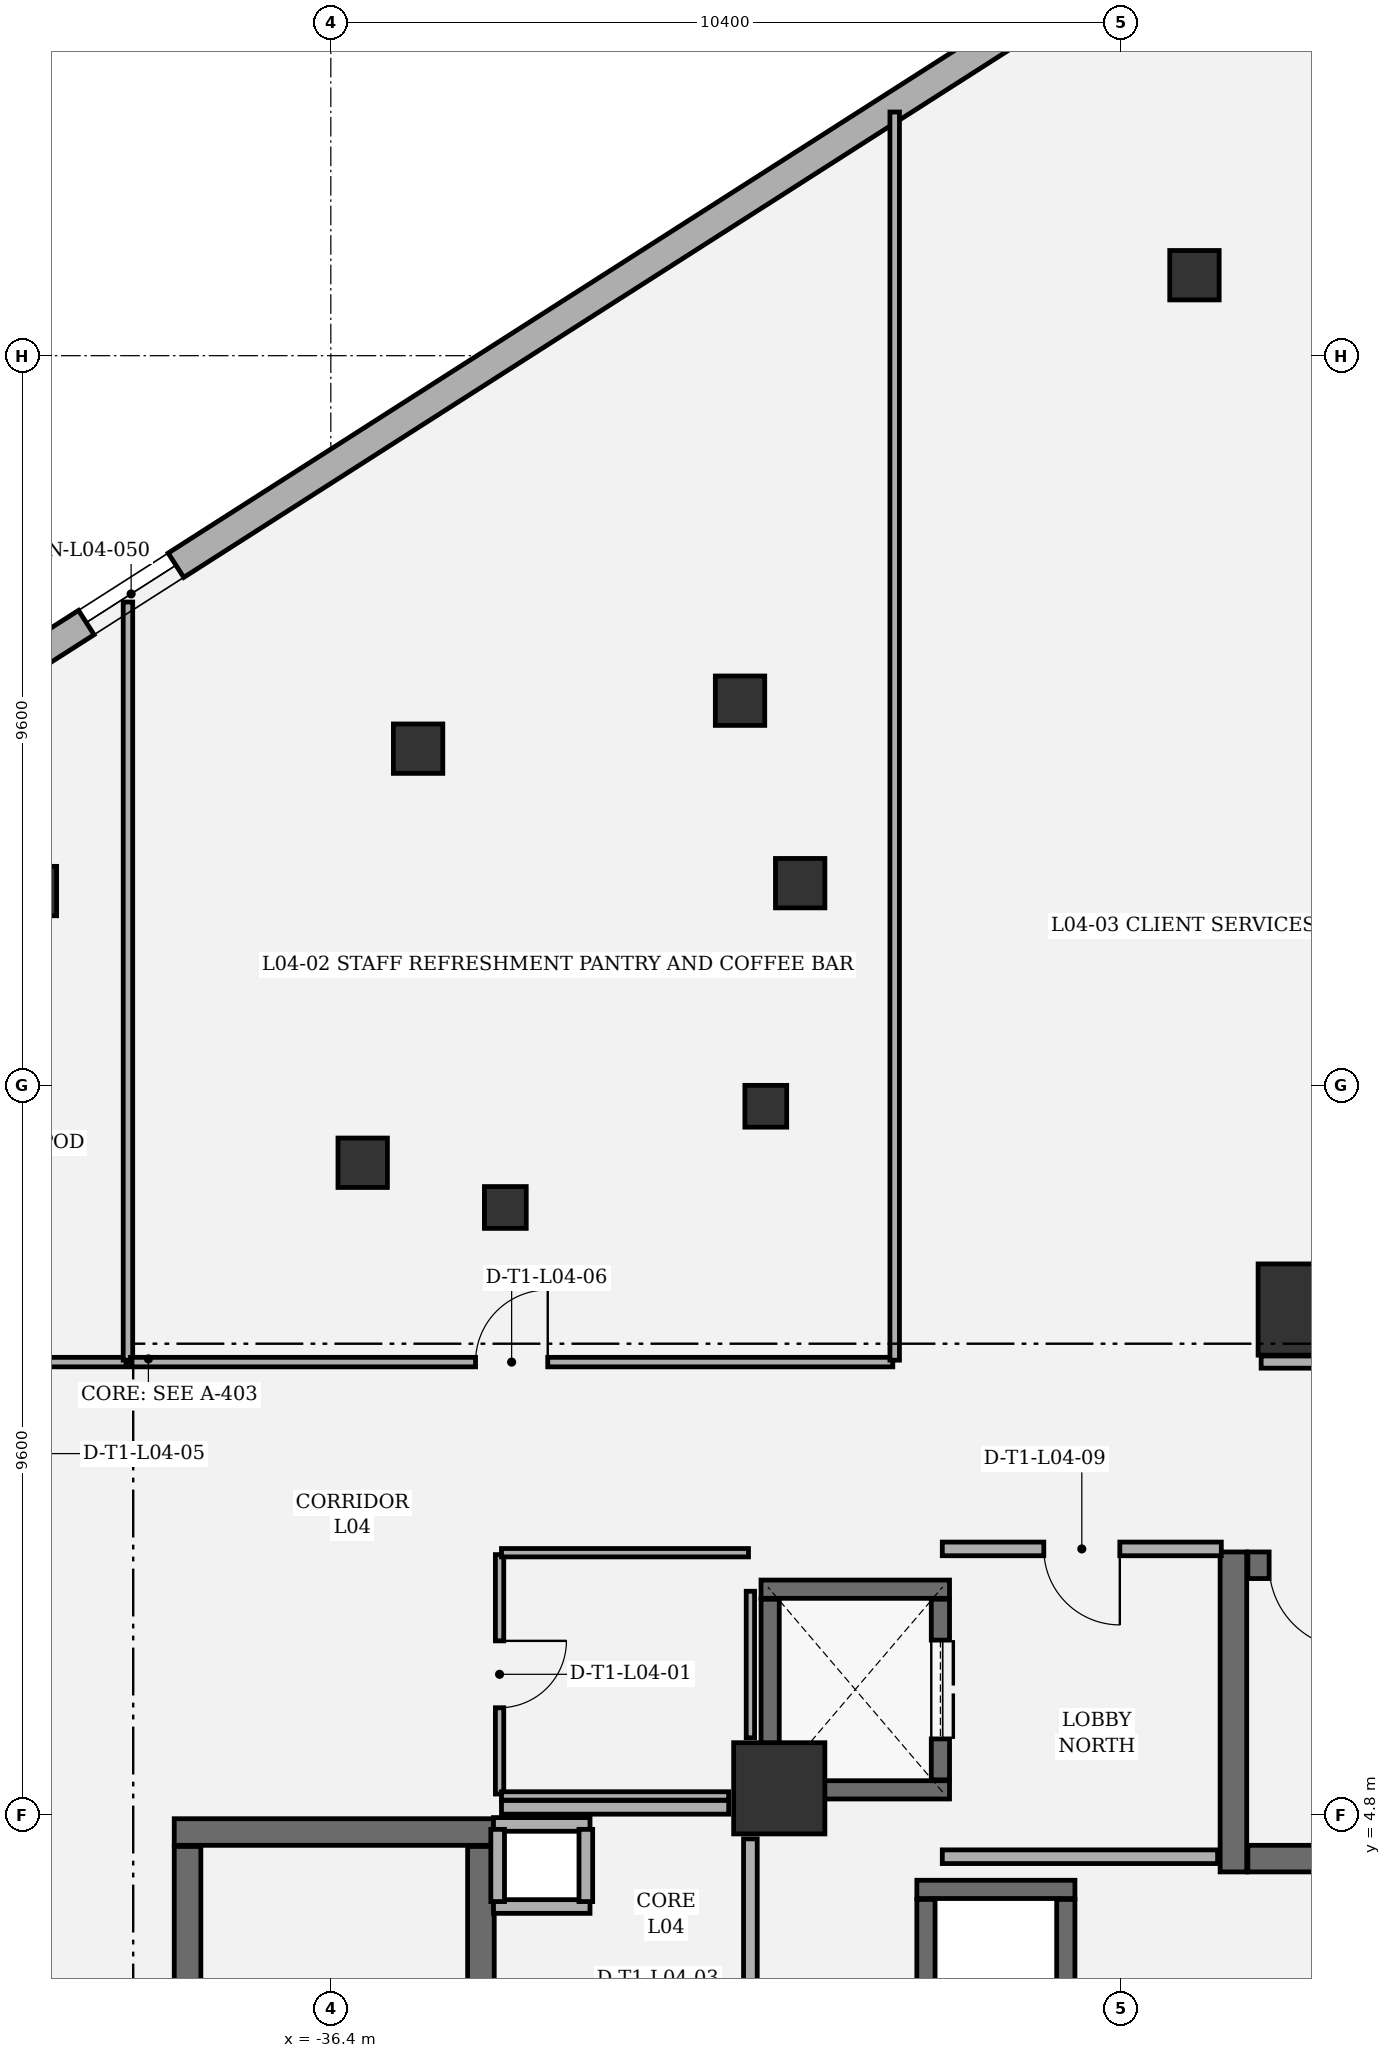
"""IFC4 building model, lengths in metres.
Left out: names, types, materials, properties, quantities, classifications, styles, units other than length and angle.
Written with IfcOpenShell. Run it as: python <this file> out.ifc"""

import sys

from ifc_helpers import new_model, si_unit, direction, frame, frame_2d, origin, origin_2d, place, context, subcontext, project, spatial, rectangle, extrude, element, fill, save


model = new_model("IFC4")
c1 = context("Model", 3, precision=1e-05, world=origin(), true_north=direction((0.0, 1.0)))
c2 = subcontext(c1, "Body", "Model", "MODEL_VIEW")
j1 = project(units=[si_unit("LENGTHUNIT", "METRE"), si_unit("PLANEANGLEUNIT", "RADIAN")], contexts=[c1])
p1 = place(None, origin())
s1 = spatial("IfcSite", under=j1, at=p1, CompositionType="ELEMENT")
p2 = place(p1, origin())
s2 = spatial("IfcBuilding", under=s1, at=p2, CompositionType="ELEMENT")
p3 = place(p2, frame((0.0, 0.0, 22.0)))
s3 = spatial("IfcBuildingStorey", under=s2, at=p3, CompositionType="ELEMENT", Elevation=22.0)
for number, where, z_axis, x_axis in (
    (1, (-23.6, 11.45, 0.0), (0.0, 0.0, 1.0), (1.0, 0.0, 0.0)),
    (2, (-30.5, 5.15, 0.0), (0.0, 0.0, 1.0), (1.0, 0.0, 0.0)),
):
    element("IfcColumn", number, at=place(p3, frame(where, z_axis=z_axis, x_axis=x_axis)), inside=s3, PredefinedType="COLUMN", context=c2, shape_type="SweptSolid", body=[
        extrude(rectangle(XDim=1.2, YDim=1.2, at=origin_2d()), origin(), (0.0, 0.0, 1.0), 5.0),
    ])
for number, where, z_axis, x_axis in (
    (3, (-40.333, 16.956, 0.0), (0.0, 0.0, 1.0), (1.0, 0.0, 0.0)),
    (4, (-35.252, 18.829, 0.0), (0.0, 0.0, 1.0), (1.0, 0.0, 0.0)),
    (5, (-25.038, 25.059, 0.0), (0.0, 0.0, 1.0), (1.0, 0.0, 0.0)),
    (6, (-31.016, 19.46, 0.0), (0.0, 0.0, 1.0), (1.0, 0.0, 0.0)),
    (7, (-35.981, 13.381, 0.0), (0.0, 0.0, 1.0), (1.0, 0.0, 0.0)),
    (8, (-30.225, 17.06, 0.0), (0.0, 0.0, 1.0), (1.0, 0.0, 0.0)),
):
    element("IfcColumn", number, at=place(p3, frame(where, z_axis=z_axis, x_axis=x_axis)), inside=s3, PredefinedType="COLUMN", context=c2, shape_type="SweptSolid", body=[
        extrude(rectangle(XDim=0.65, YDim=0.65, at=origin_2d()), origin(), (0.0, 0.0, 1.0), 5.0),
    ])
for number, where, z_axis, x_axis in (
    (9, (-34.104, 12.792, 0.0), (0.0, 0.0, 1.0), (1.0, 0.0, 0.0)),
    (10, (-30.677, 14.124, 0.0), (0.0, 0.0, 1.0), (1.0, 0.0, 0.0)),
):
    element("IfcColumn", number, at=place(p3, frame(where, z_axis=z_axis, x_axis=x_axis)), inside=s3, PredefinedType="COLUMN", context=c2, shape_type="SweptSolid", body=[
        extrude(rectangle(XDim=0.55, YDim=0.55, at=origin_2d()), origin(), (0.0, 0.0, 1.0), 5.0),
    ])
p4 = place(p3, frame((-64.419, 4.637, 0.0), z_axis=(0.0, 0.0, 1.0), x_axis=(0.842602364841, 0.538536214905, 0.0)))
e11 = element("IfcWall", 11, at=p4, inside=s3, PredefinedType="SOLIDWALL", context=c2, shape_type="SweptSolid", body=[
    extrude(rectangle(XDim=60.27, YDim=0.38, at=frame_2d((30.135, 0.0))), origin(), (0.0, 0.0, 1.0), 4.58),
])
p5 = place(p4, frame((29.435, 0.0, 0.8)))
e12 = element("IfcOpeningElement", 12, at=p5, cuts=e11, PredefinedType="OPENING", context=c2, shape_type="SweptSolid", body=[
    extrude(rectangle(XDim=1.4, YDim=1.5, at=frame_2d((0.7, 0.75))), frame((0.0, 0.2, 0.0), z_axis=(0.0, -1.0, 0.0), x_axis=(1.0, 0.0, 0.0)), (0.0, 0.0, 1.0), 0.4),
])
p6 = place(p3, frame((-24.525, 8.26, 0.0), z_axis=(0.0, 0.0, 1.0), x_axis=(0.0, -1.0, 0.0)))
e13 = element("IfcWall", 13, at=p6, inside=s3, PredefinedType="SHEAR", context=c2, shape_type="SweptSolid", body=[
    extrude(rectangle(XDim=4.21, YDim=0.35, at=frame_2d((2.105, 0.0))), origin(), (0.0, 0.0, 1.0), 4.58),
])
p7 = place(p3, frame((-24.335, 4.225, 0.0), z_axis=(0.0, 0.0, 1.0), x_axis=(1.0, 0.0, 0.0)))
e14 = element("IfcWall", 14, at=p7, inside=s3, PredefinedType="SHEAR", context=c2, shape_type="SweptSolid", body=[
    extrude(rectangle(XDim=8.12, YDim=0.35, at=frame_2d((4.06, 0.0))), origin(), (0.0, 0.0, 1.0), 4.58),
])
p8 = place(p3, frame((-16.215, 8.085, 0.0), z_axis=(0.0, 0.0, 1.0), x_axis=(-1.0, 0.0, 0.0)))
e15 = element("IfcWall", 15, at=p8, inside=s3, PredefinedType="SHEAR", context=c2, shape_type="SweptSolid", body=[
    extrude(rectangle(XDim=8.12, YDim=0.35, at=frame_2d((4.06, 0.0))), origin(), (0.0, 0.0, 1.0), 4.58),
])
p9 = place(p8, frame((6.74, 0.0, 0.0)))
e16 = element("IfcOpeningElement", 16, at=p9, cuts=e15, PredefinedType="OPENING", context=c2, shape_type="SweptSolid", body=[
    extrude(rectangle(XDim=1.1, YDim=2.2, at=frame_2d((0.55, 1.1))), frame((0.0, 0.185, 0.0), z_axis=(0.0, -1.0, 0.0), x_axis=(1.0, 0.0, 0.0)), (0.0, 0.0, 1.0), 0.37),
])
p10 = place(p3, frame((-34.25, 4.575, 0.0), z_axis=(0.0, 0.0, 1.0), x_axis=(-1.0, 0.0, 0.0)))
e17 = element("IfcWall", 17, at=p10, inside=s3, PredefinedType="SHEAR", context=c2, shape_type="SweptSolid", body=[
    extrude(rectangle(XDim=4.21, YDim=0.35, at=frame_2d((2.105, 0.0))), origin(), (0.0, 0.0, 1.0), 4.58),
])
for number, where, z_axis, x_axis in (
    (18, (-34.425, -4.385, 0.0), (0.0, 0.0, 1.0), (0.0, 1.0, 0.0)),
    (19, (-38.285, 4.385, 0.0), (0.0, 0.0, 1.0), (0.0, -1.0, 0.0)),
):
    element("IfcWall", number, at=place(p3, frame(where, z_axis=z_axis, x_axis=x_axis)), inside=s3, PredefinedType="SHEAR", context=c2, shape_type="SweptSolid", body=[
        extrude(rectangle(XDim=8.77, YDim=0.35, at=frame_2d((4.385, 0.0))), origin(), (0.0, 0.0, 1.0), 4.58),
    ])
for number, where, z_axis, x_axis in (
    (20, (-28.26, 5.13, 0.0), (0.0, 0.0, 1.0), (-1.0, 0.0, 0.0)),
    (21, (-30.74, 7.77, 0.0), (0.0, 0.0, 1.0), (1.0, 0.0, 0.0)),
):
    element("IfcWall", number, at=place(p3, frame(where, z_axis=z_axis, x_axis=x_axis)), inside=s3, PredefinedType="SHEAR", context=c2, shape_type="SweptSolid", body=[
        extrude(rectangle(XDim=2.48, YDim=0.24, at=frame_2d((1.24, 0.0))), origin(), (0.0, 0.0, 1.0), 4.58),
    ])
p11 = place(p3, frame((-30.62, 5.262, 0.0), z_axis=(0.0, 0.0, 1.0), x_axis=(0.0, 1.0, 0.0)))
e22 = element("IfcWall", 22, at=p11, inside=s3, PredefinedType="SHEAR", context=c2, shape_type="SweptSolid", body=[
    extrude(rectangle(XDim=2.376, YDim=0.24, at=frame_2d((1.188, 0.0))), origin(), (0.0, 0.0, 1.0), 4.58),
])
p12 = place(p3, frame((-28.38, 7.638, 0.0), z_axis=(0.0, 0.0, 1.0), x_axis=(0.0, -1.0, 0.0)))
e23 = element("IfcWall", 23, at=p12, inside=s3, PredefinedType="SHEAR", context=c2, shape_type="SweptSolid", body=[
    extrude(rectangle(XDim=2.376, YDim=0.24, at=frame_2d((1.188, 0.0))), origin(), (0.0, 0.0, 1.0), 4.58),
])
p13 = place(p12, frame((0.538, 0.0, 0.0)))
e24 = element("IfcOpeningElement", 24, at=p13, cuts=e23, PredefinedType="OPENING", context=c2, shape_type="SweptSolid", body=[
    extrude(rectangle(XDim=1.3, YDim=2.3, at=frame_2d((0.65, 1.15))), frame((0.0, 0.13, 0.0), z_axis=(0.0, -1.0, 0.0), x_axis=(1.0, 0.0, 0.0)), (0.0, 0.0, 1.0), 0.26),
])
p14 = place(p3, frame((-28.69, 3.82, 0.0), z_axis=(0.0, 0.0, 1.0), x_axis=(1.0, 0.0, 0.0)))
e25 = element("IfcWall", 25, at=p14, inside=s3, PredefinedType="SHEAR", context=c2, shape_type="SweptSolid", body=[
    extrude(rectangle(XDim=2.08, YDim=0.24, at=frame_2d((1.04, 0.0))), origin(), (0.0, 0.0, 1.0), 4.58),
])
for number, where, z_axis, x_axis in (
    (26, (-28.57, 1.562, 0.0), (0.0, 0.0, 1.0), (0.0, 1.0, 0.0)),
    (27, (-26.73, 3.688, 0.0), (0.0, 0.0, 1.0), (0.0, -1.0, 0.0)),
):
    element("IfcWall", number, at=place(p3, frame(where, z_axis=z_axis, x_axis=x_axis)), inside=s3, PredefinedType="SHEAR", context=c2, shape_type="SweptSolid", body=[
        extrude(rectangle(XDim=2.126, YDim=0.24, at=frame_2d((1.063, 0.0))), origin(), (0.0, 0.0, 1.0), 4.58),
    ])
for number, where, z_axis, x_axis in (
    (28, (-32.99, 3.595, 0.0), (0.0, 0.0, 1.0), (-1.0, 0.0, 0.0)),
    (29, (-34.26, 4.675, 0.0), (0.0, 0.0, 1.0), (1.0, 0.0, 0.0)),
):
    element("IfcWall", number, at=place(p3, frame(where, z_axis=z_axis, x_axis=x_axis)), inside=s3, PredefinedType="PARTITIONING", context=c2, shape_type="SweptSolid", body=[
        extrude(rectangle(XDim=1.27, YDim=0.18, at=frame_2d((0.635, 0.0))), origin(), (0.0, 0.0, 1.0), 4.58),
    ])
for number, where, z_axis, x_axis in (
    (30, (-34.205, 3.66, 0.0), (0.0, 0.0, 1.0), (0.0, 1.0, 0.0)),
    (31, (-33.045, 4.61, 0.0), (0.0, 0.0, 1.0), (0.0, -1.0, 0.0)),
):
    element("IfcWall", number, at=place(p3, frame(where, z_axis=z_axis, x_axis=x_axis)), inside=s3, PredefinedType="PARTITIONING", context=c2, shape_type="SweptSolid", body=[
        extrude(rectangle(XDim=0.95, YDim=0.18, at=frame_2d((0.475, 0.0))), origin(), (0.0, 0.0, 1.0), 4.58),
    ])
p15 = place(p3, frame((-28.355, 4.25, 0.0), z_axis=(0.0, 0.0, 1.0), x_axis=(1.0, 0.0, 0.0)))
e32 = element("IfcWall", 32, at=p15, inside=s3, PredefinedType="PARTITIONING", context=c2, shape_type="SweptSolid", body=[
    extrude(rectangle(XDim=3.622, YDim=0.18, at=frame_2d((1.811, 0.0))), origin(), (0.0, 0.0, 1.0), 4.58),
])
p16 = place(p3, frame((-24.684, 8.3, 0.0), z_axis=(0.0, 0.0, 1.0), x_axis=(-1.0, 0.0, 0.0)))
e33 = element("IfcWall", 33, at=p16, inside=s3, PredefinedType="PARTITIONING", context=c2, shape_type="SweptSolid", body=[
    extrude(rectangle(XDim=3.671, YDim=0.18, at=frame_2d((1.835, 0.0))), origin(), (0.0, 0.0, 1.0), 4.093),
])
p17 = place(p16, frame((1.335, 0.0, 0.0)))
e34 = element("IfcOpeningElement", 34, at=p17, cuts=e33, PredefinedType="OPENING", context=c2, shape_type="SweptSolid", body=[
    extrude(rectangle(XDim=1.0, YDim=2.15, at=frame_2d((0.5, 1.075))), frame((0.0, 0.1, 0.0), z_axis=(0.0, -1.0, 0.0), x_axis=(1.0, 0.0, 0.0)), (0.0, 0.0, 1.0), 0.2),
])
p18 = place(p3, frame((-34.18, 8.225, 0.0), z_axis=(0.0, 0.0, 1.0), x_axis=(0.0, -1.0, 0.0)))
e35 = element("IfcWall", 35, at=p18, inside=s3, PredefinedType="PARTITIONING", context=c2, shape_type="SweptSolid", body=[
    extrude(rectangle(XDim=3.15, YDim=0.11, at=frame_2d((1.575, 0.0))), origin(), (0.0, 0.0, 1.0), 4.58),
])
p19 = place(p18, frame((1.135, 0.0, 0.0)))
e36 = element("IfcOpeningElement", 36, at=p19, cuts=e35, PredefinedType="OPENING", context=c2, shape_type="SweptSolid", body=[
    extrude(rectangle(XDim=0.88, YDim=2.1, at=frame_2d((0.44, 1.05))), frame((0.0, 0.065, 0.0), z_axis=(0.0, -1.0, 0.0), x_axis=(1.0, 0.0, 0.0)), (0.0, 0.0, 1.0), 0.13),
])
p20 = place(p3, frame((-34.155, 5.05, 0.0), z_axis=(0.0, 0.0, 1.0), x_axis=(1.0, 0.0, 0.0)))
e37 = element("IfcWall", 37, at=p20, inside=s3, PredefinedType="PARTITIONING", context=c2, shape_type="SweptSolid", body=[
    extrude(rectangle(XDim=2.99, YDim=0.11, at=frame_2d((1.495, 0.0))), origin(), (0.0, 0.0, 1.0), 4.58),
])
p21 = place(p3, frame((-30.88, 5.815, 0.0), z_axis=(0.0, 0.0, 1.0), x_axis=(0.0, 1.0, 0.0)))
e38 = element("IfcWall", 38, at=p21, inside=s3, PredefinedType="PARTITIONING", context=c2, shape_type="SweptSolid", body=[
    extrude(rectangle(XDim=1.928, YDim=0.11, at=frame_2d((0.964, 0.0))), origin(), (0.0, 0.0, 1.0), 4.58),
])
p22 = place(p3, frame((-30.905, 8.25, 0.0), z_axis=(0.0, 0.0, 1.0), x_axis=(-1.0, 0.0, 0.0)))
e39 = element("IfcWall", 39, at=p22, inside=s3, PredefinedType="PARTITIONING", context=c2, shape_type="SweptSolid", body=[
    extrude(rectangle(XDim=3.25, YDim=0.11, at=frame_2d((1.625, 0.0))), origin(), (0.0, 0.0, 1.0), 4.093),
])
p23 = place(p3, frame((-30.88, 1.625, 0.0), z_axis=(0.0, 0.0, 1.0), x_axis=(0.0, 1.0, 0.0)))
e40 = element("IfcWall", 40, at=p23, inside=s3, PredefinedType="PARTITIONING", context=c2, shape_type="SweptSolid", body=[
    extrude(rectangle(XDim=2.86, YDim=0.18, at=frame_2d((1.43, 0.0))), origin(), (0.0, 0.0, 1.0), 4.58),
])
p24 = place(p3, frame((-31.165, 4.9, 0.0), z_axis=(0.0, 0.0, 1.0), x_axis=(-1.0, 0.0, 0.0)))
e41 = element("IfcWall", 41, at=p24, inside=s3, PredefinedType="PARTITIONING", context=c2, shape_type="SweptSolid", body=[
    extrude(rectangle(XDim=2.99, YDim=0.18, at=frame_2d((1.495, 0.0))), origin(), (0.0, 0.0, 1.0), 4.58),
])
p25 = place(p3, frame((-40.633, 10.758, 0.0), z_axis=(0.0, 0.0, 1.0), x_axis=(1.0, 0.0, 0.0)))
e42 = element("IfcWall", 42, at=p25, inside=s3, PredefinedType="PARTITIONING", context=c2, shape_type="SweptSolid", body=[
    extrude(rectangle(XDim=1.539, YDim=0.125, at=frame_2d((0.77, 0.0))), origin(), (0.0, 0.0, 1.0), 4.58),
])
p26 = place(p3, frame((-39.069, 10.783, 0.0), z_axis=(0.0, 0.0, 1.0), x_axis=(0.0, 1.0, 0.0)))
e43 = element("IfcWall", 43, at=p26, inside=s3, PredefinedType="PARTITIONING", context=c2, shape_type="SweptSolid", body=[
    extrude(rectangle(XDim=9.976, YDim=0.125, at=frame_2d((4.988, 0.0))), origin(), (0.0, 0.0, 1.0), 4.58),
])
p27 = place(p3, frame((-39.036, 10.758, 0.0), z_axis=(0.0, 0.0, 1.0), x_axis=(1.0, 0.0, 0.0)))
e44 = element("IfcWall", 44, at=p27, inside=s3, PredefinedType="PARTITIONING", context=c2, shape_type="SweptSolid", body=[
    extrude(rectangle(XDim=10.03, YDim=0.125, at=frame_2d((5.015, 0.0))), origin(), (0.0, 0.0, 1.0), 2.25),
])
p28 = place(p27, frame((4.54, 0.0, 0.0)))
e45 = element("IfcOpeningElement", 45, at=p28, cuts=e44, PredefinedType="OPENING", context=c2, shape_type="SweptSolid", body=[
    extrude(rectangle(XDim=0.95, YDim=2.15, at=frame_2d((0.475, 1.075))), frame((0.0, 0.073, 0.0), z_axis=(0.0, -1.0, 0.0), x_axis=(1.0, 0.0, 0.0)), (0.0, 0.0, 1.0), 0.145),
])
p29 = place(p3, frame((-28.981, 10.783, 0.0), z_axis=(0.0, 0.0, 1.0), x_axis=(0.0, 1.0, 0.0)))
e46 = element("IfcWall", 46, at=p29, inside=s3, PredefinedType="PARTITIONING", context=c2, shape_type="SweptSolid", body=[
    extrude(rectangle(XDim=16.423, YDim=0.125, at=frame_2d((8.211, 0.0))), origin(), (0.0, 0.0, 1.0), 4.58),
])
p30 = place(p3, frame((-24.16, 10.758, 0.0), z_axis=(0.0, 0.0, 1.0), x_axis=(1.0, 0.0, 0.0)))
e47 = element("IfcWall", 47, at=p30, inside=s3, PredefinedType="PARTITIONING", context=c2, shape_type="SweptSolid", body=[
    extrude(rectangle(XDim=7.277, YDim=0.16, at=frame_2d((3.638, 0.0))), origin(), (0.0, 0.0, 1.0), 2.25),
])
p31 = place(p30, frame((3.088, 0.0, 0.0)))
e48 = element("IfcOpeningElement", 48, at=p31, cuts=e47, PredefinedType="OPENING", context=c2, shape_type="SweptSolid", body=[
    extrude(rectangle(XDim=1.1, YDim=2.15, at=frame_2d((0.55, 1.075))), frame((0.0, 0.09, 0.0), z_axis=(0.0, -1.0, 0.0), x_axis=(1.0, 0.0, 0.0)), (0.0, 0.0, 1.0), 0.18),
])
p32 = place(p5, origin())
e49 = element("IfcWindow", 49, at=p32, inside=s3, PartitioningType="SINGLE_PANEL", PredefinedType="WINDOW", context=c2, shape_type="SweptSolid", body=[
    extrude(rectangle(XDim=1.4, YDim=1.5, at=frame_2d((0.7, 0.75))), frame((0.0, 0.03, 0.0), z_axis=(0.0, -1.0, 0.0), x_axis=(1.0, 0.0, 0.0)), (0.0, 0.0, 1.0), 0.06),
])
fill(e12, e49)
p33 = place(p9, origin())
e50 = element("IfcDoor", 50, at=p33, inside=s3, OperationType="SINGLE_SWING_LEFT", PredefinedType="DOOR", context=c2, shape_type="SweptSolid", body=[
    extrude(rectangle(XDim=1.1, YDim=2.2, at=frame_2d((0.55, 1.1))), frame((0.0, 0.025, 0.0), z_axis=(0.0, -1.0, 0.0), x_axis=(1.0, 0.0, 0.0)), (0.0, 0.0, 1.0), 0.05),
])
fill(e16, e50)
p34 = place(p13, origin())
e51 = element("IfcDoor", 51, at=p34, inside=s3, OperationType="DOUBLE_DOOR_SLIDING", PredefinedType="DOOR", context=c2, shape_type="SweptSolid", body=[
    extrude(rectangle(XDim=1.3, YDim=2.3, at=frame_2d((0.65, 1.15))), frame((0.0, 0.025, 0.0), z_axis=(0.0, -1.0, 0.0), x_axis=(1.0, 0.0, 0.0)), (0.0, 0.0, 1.0), 0.05),
])
fill(e24, e51)
p35 = place(p19, origin())
e52 = element("IfcDoor", 52, at=p35, inside=s3, OperationType="SINGLE_SWING_LEFT", PredefinedType="DOOR", context=c2, shape_type="SweptSolid", body=[
    extrude(rectangle(XDim=0.88, YDim=2.1, at=frame_2d((0.44, 1.05))), frame((0.0, 0.025, 0.0), z_axis=(0.0, -1.0, 0.0), x_axis=(1.0, 0.0, 0.0)), (0.0, 0.0, 1.0), 0.05),
])
fill(e36, e52)
p36 = place(p28, origin())
e53 = element("IfcDoor", 53, at=p36, inside=s3, OperationType="SINGLE_SWING_RIGHT", PredefinedType="DOOR", context=c2, shape_type="SweptSolid", body=[
    extrude(rectangle(XDim=0.95, YDim=2.15, at=frame_2d((0.475, 1.075))), frame((0.0, 0.025, 0.0), z_axis=(0.0, -1.0, 0.0), x_axis=(1.0, 0.0, 0.0)), (0.0, 0.0, 1.0), 0.05),
])
fill(e45, e53)
p37 = place(p17, origin())
e54 = element("IfcDoor", 54, at=p37, inside=s3, OperationType="SINGLE_SWING_LEFT", PredefinedType="DOOR", context=c2, shape_type="SweptSolid", body=[
    extrude(rectangle(XDim=1.0, YDim=2.15, at=frame_2d((0.5, 1.075))), frame((0.0, 0.025, 0.0), z_axis=(0.0, -1.0, 0.0), x_axis=(1.0, 0.0, 0.0)), (0.0, 0.0, 1.0), 0.05),
])
fill(e34, e54)
save(model, sys.argv[1])
